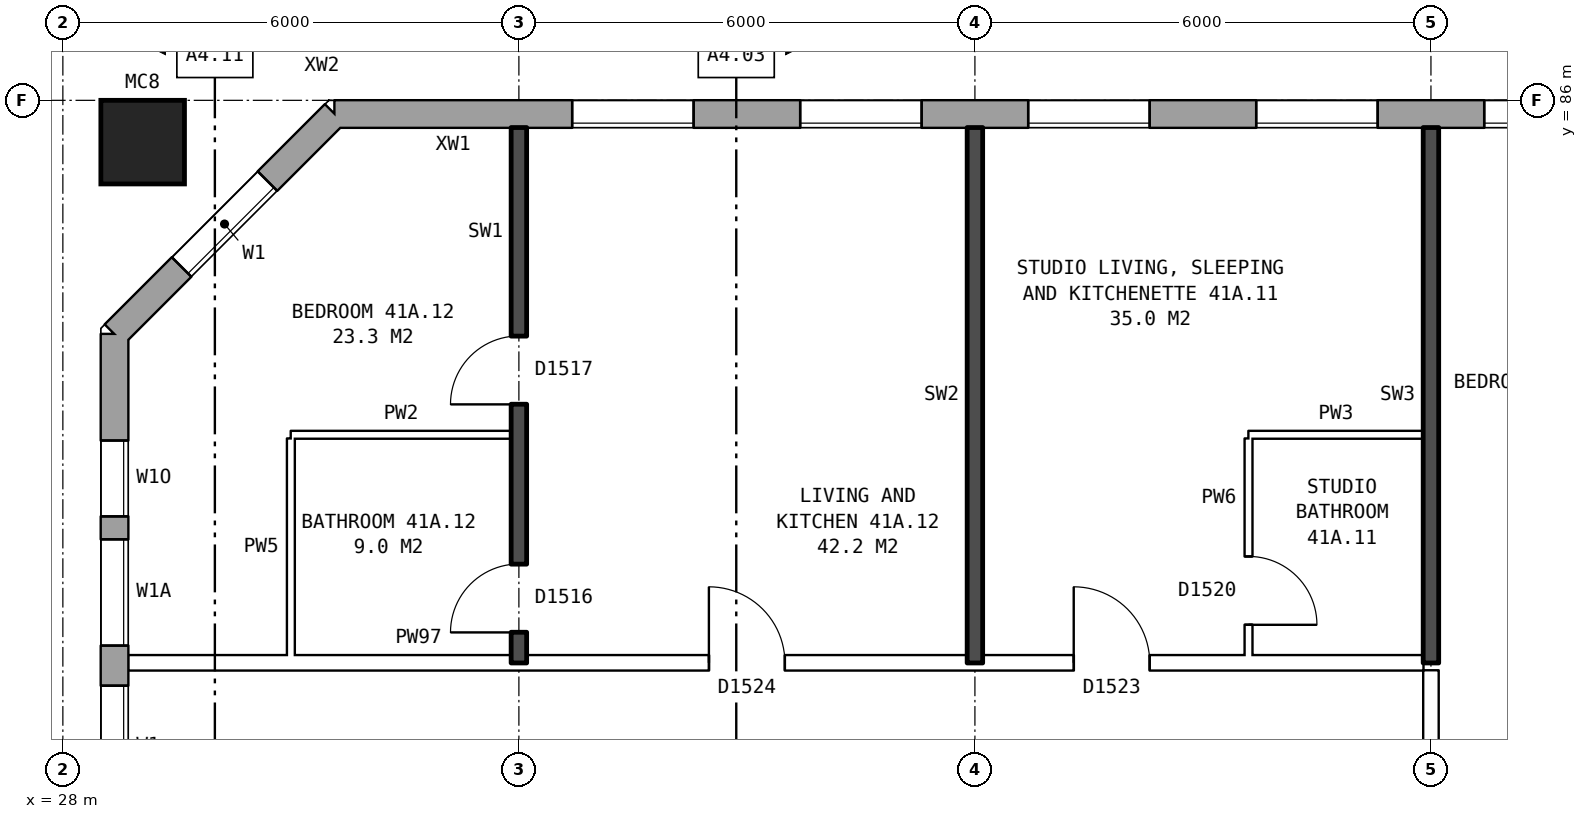
"""IFC4 building model, lengths in metres.
Left out: names, types, materials, properties, quantities, classifications, styles, units other than length and angle.
Written with IfcOpenShell. Run it as: python <this file> out.ifc"""

import sys

from ifc_helpers import new_model, si_unit, direction, frame, frame_2d, origin, origin_2d, place, context, subcontext, project, spatial, rectangle, hollow_rectangle, extrude, element, fill, save


model = new_model("IFC4")
c1 = context("Model", 3, precision=1e-05, world=origin(), true_north=direction((0.0, 1.0)))
c2 = subcontext(c1, "Body", "Model", "MODEL_VIEW")
j1 = project(units=[si_unit("LENGTHUNIT", "METRE"), si_unit("PLANEANGLEUNIT", "RADIAN")], contexts=[c1])
p1 = place(None, origin())
s1 = spatial("IfcSite", under=j1, at=p1, CompositionType="ELEMENT")
p2 = place(p1, origin())
s2 = spatial("IfcBuilding", under=s1, at=p2, CompositionType="ELEMENT")
p3 = place(p2, frame((0.0, 0.0, 148.5)))
s3 = spatial("IfcBuildingStorey", under=s2, at=p3, CompositionType="ELEMENT", Elevation=148.5)
p4 = place(p3, frame((29.05, 85.45, 0.0), z_axis=(0.0, 0.0, 1.0), x_axis=(1.0, 0.0, 0.0)))
e1 = element("IfcColumn", 1, at=p4, inside=s3, PredefinedType="COLUMN", context=c2, shape_type="SweptSolid", body=[
    extrude(hollow_rectangle(XDim=1.1, YDim=1.1, WallThickness=0.06, at=origin_2d()), origin(), (0.0, 0.0, 1.0), 3.1),
])
p5 = place(p3, frame((72.925, 85.82, 0.0), z_axis=(0.0, 0.0, 1.0), x_axis=(-1.0, 0.0, 0.0)))
e2 = element("IfcWall", 2, at=p5, inside=s3, PredefinedType="STANDARD", context=c2, shape_type="SweptSolid", body=[
    extrude(rectangle(XDim=41.351, YDim=0.36, at=frame_2d((20.675, 0.0))), origin(), (0.0, 0.0, 1.0), 2.85),
])
p6 = place(p5, frame((0.3, 0.0, 0.8)))
e3 = element("IfcOpeningElement", 3, at=p6, cuts=e2, PredefinedType="OPENING", context=c2, shape_type="SweptSolid", body=[
    extrude(rectangle(XDim=0.8, YDim=0.9, at=frame_2d((0.4, 0.45))), frame((0.0, 0.19, 0.0), z_axis=(0.0, -1.0, 0.0), x_axis=(1.0, 0.0, 0.0)), (0.0, 0.0, 1.0), 0.38),
])
p7 = place(p5, frame((3.625, 0.0, 0.8)))
e4 = element("IfcOpeningElement", 4, at=p7, cuts=e2, PredefinedType="OPENING", context=c2, shape_type="SweptSolid", body=[
    extrude(rectangle(XDim=1.6, YDim=1.8, at=frame_2d((0.8, 0.9))), frame((0.0, 0.19, 0.0), z_axis=(0.0, -1.0, 0.0), x_axis=(1.0, 0.0, 0.0)), (0.0, 0.0, 1.0), 0.38),
])
p8 = place(p5, frame((6.625, 0.0, 0.8)))
e5 = element("IfcOpeningElement", 5, at=p8, cuts=e2, PredefinedType="OPENING", context=c2, shape_type="SweptSolid", body=[
    extrude(rectangle(XDim=1.6, YDim=1.8, at=frame_2d((0.8, 0.9))), frame((0.0, 0.19, 0.0), z_axis=(0.0, -1.0, 0.0), x_axis=(1.0, 0.0, 0.0)), (0.0, 0.0, 1.0), 0.38),
])
p9 = place(p5, frame((9.625, 0.0, 0.8)))
e6 = element("IfcOpeningElement", 6, at=p9, cuts=e2, PredefinedType="OPENING", context=c2, shape_type="SweptSolid", body=[
    extrude(rectangle(XDim=1.6, YDim=1.8, at=frame_2d((0.8, 0.9))), frame((0.0, 0.19, 0.0), z_axis=(0.0, -1.0, 0.0), x_axis=(1.0, 0.0, 0.0)), (0.0, 0.0, 1.0), 0.38),
])
p10 = place(p5, frame((12.625, 0.0, 0.8)))
e7 = element("IfcOpeningElement", 7, at=p10, cuts=e2, PredefinedType="OPENING", context=c2, shape_type="SweptSolid", body=[
    extrude(rectangle(XDim=1.6, YDim=1.8, at=frame_2d((0.8, 0.9))), frame((0.0, 0.19, 0.0), z_axis=(0.0, -1.0, 0.0), x_axis=(1.0, 0.0, 0.0)), (0.0, 0.0, 1.0), 0.38),
])
p11 = place(p5, frame((15.625, 0.0, 0.8)))
e8 = element("IfcOpeningElement", 8, at=p11, cuts=e2, PredefinedType="OPENING", context=c2, shape_type="SweptSolid", body=[
    extrude(rectangle(XDim=1.6, YDim=1.8, at=frame_2d((0.8, 0.9))), frame((0.0, 0.19, 0.0), z_axis=(0.0, -1.0, 0.0), x_axis=(1.0, 0.0, 0.0)), (0.0, 0.0, 1.0), 0.38),
])
p12 = place(p5, frame((18.625, 0.0, 0.8)))
e9 = element("IfcOpeningElement", 9, at=p12, cuts=e2, PredefinedType="OPENING", context=c2, shape_type="SweptSolid", body=[
    extrude(rectangle(XDim=1.6, YDim=1.8, at=frame_2d((0.8, 0.9))), frame((0.0, 0.19, 0.0), z_axis=(0.0, -1.0, 0.0), x_axis=(1.0, 0.0, 0.0)), (0.0, 0.0, 1.0), 0.38),
])
p13 = place(p5, frame((21.625, 0.0, 0.8)))
e10 = element("IfcOpeningElement", 10, at=p13, cuts=e2, PredefinedType="OPENING", context=c2, shape_type="SweptSolid", body=[
    extrude(rectangle(XDim=1.6, YDim=1.8, at=frame_2d((0.8, 0.9))), frame((0.0, 0.19, 0.0), z_axis=(0.0, -1.0, 0.0), x_axis=(1.0, 0.0, 0.0)), (0.0, 0.0, 1.0), 0.38),
])
p14 = place(p5, frame((24.625, 0.0, 0.8)))
e11 = element("IfcOpeningElement", 11, at=p14, cuts=e2, PredefinedType="OPENING", context=c2, shape_type="SweptSolid", body=[
    extrude(rectangle(XDim=1.6, YDim=1.8, at=frame_2d((0.8, 0.9))), frame((0.0, 0.19, 0.0), z_axis=(0.0, -1.0, 0.0), x_axis=(1.0, 0.0, 0.0)), (0.0, 0.0, 1.0), 0.38),
])
p15 = place(p5, frame((27.625, 0.0, 0.8)))
e12 = element("IfcOpeningElement", 12, at=p15, cuts=e2, PredefinedType="OPENING", context=c2, shape_type="SweptSolid", body=[
    extrude(rectangle(XDim=1.6, YDim=1.8, at=frame_2d((0.8, 0.9))), frame((0.0, 0.19, 0.0), z_axis=(0.0, -1.0, 0.0), x_axis=(1.0, 0.0, 0.0)), (0.0, 0.0, 1.0), 0.38),
])
p16 = place(p5, frame((30.625, 0.0, 0.8)))
e13 = element("IfcOpeningElement", 13, at=p16, cuts=e2, PredefinedType="OPENING", context=c2, shape_type="SweptSolid", body=[
    extrude(rectangle(XDim=1.6, YDim=1.8, at=frame_2d((0.8, 0.9))), frame((0.0, 0.19, 0.0), z_axis=(0.0, -1.0, 0.0), x_axis=(1.0, 0.0, 0.0)), (0.0, 0.0, 1.0), 0.38),
])
p17 = place(p5, frame((33.625, 0.0, 0.8)))
e14 = element("IfcOpeningElement", 14, at=p17, cuts=e2, PredefinedType="OPENING", context=c2, shape_type="SweptSolid", body=[
    extrude(rectangle(XDim=1.6, YDim=1.8, at=frame_2d((0.8, 0.9))), frame((0.0, 0.19, 0.0), z_axis=(0.0, -1.0, 0.0), x_axis=(1.0, 0.0, 0.0)), (0.0, 0.0, 1.0), 0.38),
])
p18 = place(p5, frame((36.625, 0.0, 0.8)))
e15 = element("IfcOpeningElement", 15, at=p18, cuts=e2, PredefinedType="OPENING", context=c2, shape_type="SweptSolid", body=[
    extrude(rectangle(XDim=1.6, YDim=1.8, at=frame_2d((0.8, 0.9))), frame((0.0, 0.19, 0.0), z_axis=(0.0, -1.0, 0.0), x_axis=(1.0, 0.0, 0.0)), (0.0, 0.0, 1.0), 0.38),
])
p19 = place(p5, frame((1.4, 0.0, 0.8)))
e16 = element("IfcOpeningElement", 16, at=p19, cuts=e2, PredefinedType="OPENING", context=c2, shape_type="SweptSolid", body=[
    extrude(rectangle(XDim=1.2, YDim=1.8, at=frame_2d((0.6, 0.9))), frame((0.0, 0.19, 0.0), z_axis=(0.0, -1.0, 0.0), x_axis=(1.0, 0.0, 0.0)), (0.0, 0.0, 1.0), 0.38),
])
p20 = place(p3, frame((31.575, 85.82, 0.0), z_axis=(0.0, 0.0, 1.0), x_axis=(-0.707106781187, -0.707106781187, 0.0)))
e17 = element("IfcWall", 17, at=p20, inside=s3, PredefinedType="STANDARD", context=c2, shape_type="SweptSolid", body=[
    extrude(rectangle(XDim=4.094, YDim=0.36, at=frame_2d((2.047, 0.0))), origin(), (0.0, 0.0, 1.0), 2.85),
])
p21 = place(p20, frame((1.247, 0.0, 0.8)))
e18 = element("IfcOpeningElement", 18, at=p21, cuts=e17, PredefinedType="OPENING", context=c2, shape_type="SweptSolid", body=[
    extrude(rectangle(XDim=1.6, YDim=1.8, at=frame_2d((0.8, 0.9))), frame((0.0, 0.19, 0.0), z_axis=(0.0, -1.0, 0.0), x_axis=(1.0, 0.0, 0.0)), (0.0, 0.0, 1.0), 0.38),
])
p22 = place(p3, frame((28.68, 82.925, 0.0), z_axis=(0.0, 0.0, 1.0), x_axis=(0.0, -1.0, 0.0)))
e19 = element("IfcWall", 19, at=p22, inside=s3, PredefinedType="STANDARD", context=c2, shape_type="SweptSolid", body=[
    extrude(rectangle(XDim=25.851, YDim=0.36, at=frame_2d((12.925, 0.0))), origin(), (0.0, 0.0, 1.0), 2.85),
])
p23 = place(p22, frame((1.4, 0.0, 0.8)))
e20 = element("IfcOpeningElement", 20, at=p23, cuts=e19, PredefinedType="OPENING", context=c2, shape_type="SweptSolid", body=[
    extrude(rectangle(XDim=1.0, YDim=1.2, at=frame_2d((0.5, 0.6))), frame((0.0, 0.19, 0.0), z_axis=(0.0, -1.0, 0.0), x_axis=(1.0, 0.0, 0.0)), (0.0, 0.0, 1.0), 0.38),
])
p24 = place(p22, frame((4.625, 0.0, 0.8)))
e21 = element("IfcOpeningElement", 21, at=p24, cuts=e19, PredefinedType="OPENING", context=c2, shape_type="SweptSolid", body=[
    extrude(rectangle(XDim=1.6, YDim=1.8, at=frame_2d((0.8, 0.9))), frame((0.0, 0.19, 0.0), z_axis=(0.0, -1.0, 0.0), x_axis=(1.0, 0.0, 0.0)), (0.0, 0.0, 1.0), 0.38),
])
p25 = place(p22, frame((7.625, 0.0, 0.8)))
e22 = element("IfcOpeningElement", 22, at=p25, cuts=e19, PredefinedType="OPENING", context=c2, shape_type="SweptSolid", body=[
    extrude(rectangle(XDim=1.6, YDim=1.8, at=frame_2d((0.8, 0.9))), frame((0.0, 0.19, 0.0), z_axis=(0.0, -1.0, 0.0), x_axis=(1.0, 0.0, 0.0)), (0.0, 0.0, 1.0), 0.38),
])
p26 = place(p22, frame((10.625, 0.0, 0.8)))
e23 = element("IfcOpeningElement", 23, at=p26, cuts=e19, PredefinedType="OPENING", context=c2, shape_type="SweptSolid", body=[
    extrude(rectangle(XDim=1.6, YDim=1.8, at=frame_2d((0.8, 0.9))), frame((0.0, 0.19, 0.0), z_axis=(0.0, -1.0, 0.0), x_axis=(1.0, 0.0, 0.0)), (0.0, 0.0, 1.0), 0.38),
])
p27 = place(p22, frame((13.625, 0.0, 0.8)))
e24 = element("IfcOpeningElement", 24, at=p27, cuts=e19, PredefinedType="OPENING", context=c2, shape_type="SweptSolid", body=[
    extrude(rectangle(XDim=1.6, YDim=1.8, at=frame_2d((0.8, 0.9))), frame((0.0, 0.19, 0.0), z_axis=(0.0, -1.0, 0.0), x_axis=(1.0, 0.0, 0.0)), (0.0, 0.0, 1.0), 0.38),
])
p28 = place(p22, frame((16.625, 0.0, 0.8)))
e25 = element("IfcOpeningElement", 25, at=p28, cuts=e19, PredefinedType="OPENING", context=c2, shape_type="SweptSolid", body=[
    extrude(rectangle(XDim=1.6, YDim=1.8, at=frame_2d((0.8, 0.9))), frame((0.0, 0.19, 0.0), z_axis=(0.0, -1.0, 0.0), x_axis=(1.0, 0.0, 0.0)), (0.0, 0.0, 1.0), 0.38),
])
p29 = place(p22, frame((19.625, 0.0, 0.8)))
e26 = element("IfcOpeningElement", 26, at=p29, cuts=e19, PredefinedType="OPENING", context=c2, shape_type="SweptSolid", body=[
    extrude(rectangle(XDim=1.6, YDim=1.8, at=frame_2d((0.8, 0.9))), frame((0.0, 0.19, 0.0), z_axis=(0.0, -1.0, 0.0), x_axis=(1.0, 0.0, 0.0)), (0.0, 0.0, 1.0), 0.38),
])
p30 = place(p22, frame((21.725, 0.0, 0.8)))
e27 = element("IfcOpeningElement", 27, at=p30, cuts=e19, PredefinedType="OPENING", context=c2, shape_type="SweptSolid", body=[
    extrude(rectangle(XDim=1.4, YDim=1.8, at=frame_2d((0.7, 0.9))), frame((0.0, 0.19, 0.0), z_axis=(0.0, -1.0, 0.0), x_axis=(1.0, 0.0, 0.0)), (0.0, 0.0, 1.0), 0.38),
])
p31 = place(p22, frame((2.7, 0.0, 0.8)))
e28 = element("IfcOpeningElement", 28, at=p31, cuts=e19, PredefinedType="OPENING", context=c2, shape_type="SweptSolid", body=[
    extrude(rectangle(XDim=1.4, YDim=1.8, at=frame_2d((0.7, 0.9))), frame((0.0, 0.19, 0.0), z_axis=(0.0, -1.0, 0.0), x_axis=(1.0, 0.0, 0.0)), (0.0, 0.0, 1.0), 0.38),
])
p32 = place(p22, frame((23.425, 0.0, 0.8)))
e29 = element("IfcOpeningElement", 29, at=p32, cuts=e19, PredefinedType="OPENING", context=c2, shape_type="SweptSolid", body=[
    extrude(rectangle(XDim=1.0, YDim=1.2, at=frame_2d((0.5, 0.6))), frame((0.0, 0.19, 0.0), z_axis=(0.0, -1.0, 0.0), x_axis=(1.0, 0.0, 0.0)), (0.0, 0.0, 1.0), 0.38),
])
p33 = place(p3, frame((28.86, 78.6, 0.0), z_axis=(0.0, 0.0, 1.0), x_axis=(1.0, 0.0, 0.0)))
e30 = element("IfcWall", 30, at=p33, inside=s3, PredefinedType="PARTITIONING", context=c2, shape_type="SweptSolid", body=[
    extrude(rectangle(XDim=17.04, YDim=0.2, at=frame_2d((8.52, 0.0))), origin(), (0.0, 0.0, 1.0), 2.85),
])
p34 = place(p33, frame((12.44, 0.0, 0.0)))
e31 = element("IfcOpeningElement", 31, at=p34, cuts=e30, PredefinedType="OPENING", context=c2, shape_type="SweptSolid", body=[
    extrude(rectangle(XDim=1.0, YDim=2.1, at=frame_2d((0.5, 1.05))), frame((0.0, 0.11, 0.0), z_axis=(0.0, -1.0, 0.0), x_axis=(1.0, 0.0, 0.0)), (0.0, 0.0, 1.0), 0.22),
])
p35 = place(p33, frame((7.64, 0.0, 0.0)))
e32 = element("IfcOpeningElement", 32, at=p35, cuts=e30, PredefinedType="OPENING", context=c2, shape_type="SweptSolid", body=[
    extrude(rectangle(XDim=1.0, YDim=2.1, at=frame_2d((0.5, 1.05))), frame((0.0, 0.11, 0.0), z_axis=(0.0, -1.0, 0.0), x_axis=(1.0, 0.0, 0.0)), (0.0, 0.0, 1.0), 0.22),
])
p36 = place(p3, frame((31.0, 81.6, 0.0), z_axis=(0.0, 0.0, 1.0), x_axis=(1.0, 0.0, 0.0)))
e33 = element("IfcWall", 33, at=p36, inside=s3, PredefinedType="PARTITIONING", context=c2, shape_type="SweptSolid", body=[
    extrude(rectangle(XDim=2.9, YDim=0.1, at=frame_2d((1.45, 0.0))), origin(), (0.0, 0.0, 1.0), 2.85),
])
p37 = place(p3, frame((43.6, 81.6, 0.0), z_axis=(0.0, 0.0, 1.0), x_axis=(1.0, 0.0, 0.0)))
e34 = element("IfcWall", 34, at=p37, inside=s3, PredefinedType="PARTITIONING", context=c2, shape_type="SweptSolid", body=[
    extrude(rectangle(XDim=2.3, YDim=0.1, at=frame_2d((1.15, 0.0))), origin(), (0.0, 0.0, 1.0), 2.85),
])
p38 = place(p3, frame((31.0, 78.7, 0.0), z_axis=(0.0, 0.0, 1.0), x_axis=(0.0, 1.0, 0.0)))
e35 = element("IfcWall", 35, at=p38, inside=s3, PredefinedType="PARTITIONING", context=c2, shape_type="SweptSolid", body=[
    extrude(rectangle(XDim=2.85, YDim=0.1, at=frame_2d((1.425, 0.0))), origin(), (0.0, 0.0, 1.0), 2.85),
])
p39 = place(p3, frame((34.0, 78.6, 0.0), z_axis=(0.0, 0.0, 1.0), x_axis=(0.0, 1.0, 0.0)))
e36 = element("IfcWall", 36, at=p39, inside=s3, PredefinedType="SOLIDWALL", context=c2, shape_type="SweptSolid", body=[
    extrude(rectangle(XDim=7.04, YDim=0.2, at=frame_2d((3.52, 0.0))), origin(), (0.0, 0.0, 1.0), 2.85),
])
p40 = place(p39, frame((3.4, 0.0, 0.0)))
e37 = element("IfcOpeningElement", 37, at=p40, cuts=e36, PredefinedType="OPENING", context=c2, shape_type="SweptSolid", body=[
    extrude(rectangle(XDim=0.9, YDim=2.1, at=frame_2d((0.45, 1.05))), frame((0.0, 0.11, 0.0), z_axis=(0.0, -1.0, 0.0), x_axis=(1.0, 0.0, 0.0)), (0.0, 0.0, 1.0), 0.22),
])
p41 = place(p39, frame((0.4, 0.0, 0.0)))
e38 = element("IfcOpeningElement", 38, at=p41, cuts=e36, PredefinedType="OPENING", context=c2, shape_type="SweptSolid", body=[
    extrude(rectangle(XDim=0.9, YDim=2.1, at=frame_2d((0.45, 1.05))), frame((0.0, 0.11, 0.0), z_axis=(0.0, -1.0, 0.0), x_axis=(1.0, 0.0, 0.0)), (0.0, 0.0, 1.0), 0.22),
])
p42 = place(p3, frame((40.0, 78.6, 0.0), z_axis=(0.0, 0.0, 1.0), x_axis=(0.0, 1.0, 0.0)))
e39 = element("IfcWall", 39, at=p42, inside=s3, PredefinedType="SOLIDWALL", context=c2, shape_type="SweptSolid", body=[
    extrude(rectangle(XDim=7.04, YDim=0.2, at=frame_2d((3.52, 0.0))), origin(), (0.0, 0.0, 1.0), 2.85),
])
p43 = place(p3, frame((43.6, 78.7, 0.0), z_axis=(0.0, 0.0, 1.0), x_axis=(0.0, 1.0, 0.0)))
e40 = element("IfcWall", 40, at=p43, inside=s3, PredefinedType="PARTITIONING", context=c2, shape_type="SweptSolid", body=[
    extrude(rectangle(XDim=2.85, YDim=0.1, at=frame_2d((1.425, 0.0))), origin(), (0.0, 0.0, 1.0), 2.85),
])
p44 = place(p43, frame((0.4, 0.0, 0.0)))
e41 = element("IfcOpeningElement", 41, at=p44, cuts=e40, PredefinedType="OPENING", context=c2, shape_type="SweptSolid", body=[
    extrude(rectangle(XDim=0.9, YDim=2.1, at=frame_2d((0.45, 1.05))), frame((0.0, 0.06, 0.0), z_axis=(0.0, -1.0, 0.0), x_axis=(1.0, 0.0, 0.0)), (0.0, 0.0, 1.0), 0.12),
])
p45 = place(p3, frame((46.0, 76.3, 0.0), z_axis=(0.0, 0.0, 1.0), x_axis=(0.0, 1.0, 0.0)))
e42 = element("IfcWall", 42, at=p45, inside=s3, PredefinedType="PARTITIONING", context=c2, shape_type="SweptSolid", body=[
    extrude(rectangle(XDim=2.2, YDim=0.2, at=frame_2d((1.1, 0.0))), origin(), (0.0, 0.0, 1.0), 2.85),
])
p46 = place(p3, frame((46.0, 78.6, 0.0), z_axis=(0.0, 0.0, 1.0), x_axis=(0.0, 1.0, 0.0)))
e43 = element("IfcWall", 43, at=p46, inside=s3, PredefinedType="SOLIDWALL", context=c2, shape_type="SweptSolid", body=[
    extrude(rectangle(XDim=7.04, YDim=0.2, at=frame_2d((3.52, 0.0))), origin(), (0.0, 0.0, 1.0), 2.85),
])
p47 = place(p14, origin())
e44 = element("IfcWindow", 44, at=p47, inside=s3, PartitioningType="SINGLE_PANEL", PredefinedType="WINDOW", context=c2, shape_type="SweptSolid", body=[
    extrude(rectangle(XDim=1.6, YDim=1.8, at=frame_2d((0.8, 0.9))), frame((0.0, 0.15, 0.0), z_axis=(0.0, -1.0, 0.0), x_axis=(1.0, 0.0, 0.0)), (0.0, 0.0, 1.0), 0.06),
])
fill(e11, e44)
p48 = place(p15, origin())
e45 = element("IfcWindow", 45, at=p48, inside=s3, PartitioningType="SINGLE_PANEL", PredefinedType="WINDOW", context=c2, shape_type="SweptSolid", body=[
    extrude(rectangle(XDim=1.6, YDim=1.8, at=frame_2d((0.8, 0.9))), frame((0.0, 0.15, 0.0), z_axis=(0.0, -1.0, 0.0), x_axis=(1.0, 0.0, 0.0)), (0.0, 0.0, 1.0), 0.06),
])
fill(e12, e45)
p49 = place(p16, origin())
e46 = element("IfcWindow", 46, at=p49, inside=s3, PartitioningType="SINGLE_PANEL", PredefinedType="WINDOW", context=c2, shape_type="SweptSolid", body=[
    extrude(rectangle(XDim=1.6, YDim=1.8, at=frame_2d((0.8, 0.9))), frame((0.0, 0.15, 0.0), z_axis=(0.0, -1.0, 0.0), x_axis=(1.0, 0.0, 0.0)), (0.0, 0.0, 1.0), 0.06),
])
fill(e13, e46)
p50 = place(p17, origin())
e47 = element("IfcWindow", 47, at=p50, inside=s3, PartitioningType="SINGLE_PANEL", PredefinedType="WINDOW", context=c2, shape_type="SweptSolid", body=[
    extrude(rectangle(XDim=1.6, YDim=1.8, at=frame_2d((0.8, 0.9))), frame((0.0, 0.15, 0.0), z_axis=(0.0, -1.0, 0.0), x_axis=(1.0, 0.0, 0.0)), (0.0, 0.0, 1.0), 0.06),
])
fill(e14, e47)
p51 = place(p18, origin())
e48 = element("IfcWindow", 48, at=p51, inside=s3, PartitioningType="SINGLE_PANEL", PredefinedType="WINDOW", context=c2, shape_type="SweptSolid", body=[
    extrude(rectangle(XDim=1.6, YDim=1.8, at=frame_2d((0.8, 0.9))), frame((0.0, 0.15, 0.0), z_axis=(0.0, -1.0, 0.0), x_axis=(1.0, 0.0, 0.0)), (0.0, 0.0, 1.0), 0.06),
])
fill(e15, e48)
p52 = place(p21, origin())
e49 = element("IfcWindow", 49, at=p52, inside=s3, PartitioningType="SINGLE_PANEL", PredefinedType="WINDOW", context=c2, shape_type="SweptSolid", body=[
    extrude(rectangle(XDim=1.6, YDim=1.8, at=frame_2d((0.8, 0.9))), frame((0.0, 0.15, 0.0), z_axis=(0.0, -1.0, 0.0), x_axis=(1.0, 0.0, 0.0)), (0.0, 0.0, 1.0), 0.06),
])
fill(e18, e49)
p53 = place(p23, origin())
e50 = element("IfcWindow", 50, at=p53, inside=s3, PartitioningType="SINGLE_PANEL", PredefinedType="WINDOW", context=c2, shape_type="SweptSolid", body=[
    extrude(rectangle(XDim=1.0, YDim=1.2, at=frame_2d((0.5, 0.6))), frame((0.0, 0.15, 0.0), z_axis=(0.0, -1.0, 0.0), x_axis=(1.0, 0.0, 0.0)), (0.0, 0.0, 1.0), 0.06),
])
fill(e20, e50)
p54 = place(p24, origin())
e51 = element("IfcWindow", 51, at=p54, inside=s3, PartitioningType="SINGLE_PANEL", PredefinedType="WINDOW", context=c2, shape_type="SweptSolid", body=[
    extrude(rectangle(XDim=1.6, YDim=1.8, at=frame_2d((0.8, 0.9))), frame((0.0, 0.15, 0.0), z_axis=(0.0, -1.0, 0.0), x_axis=(1.0, 0.0, 0.0)), (0.0, 0.0, 1.0), 0.06),
])
fill(e21, e51)
p55 = place(p34, origin())
e52 = element("IfcDoor", 52, at=p55, inside=s3, OperationType="SINGLE_SWING_LEFT", PredefinedType="DOOR", context=c2, shape_type="SweptSolid", body=[
    extrude(rectangle(XDim=1.0, YDim=2.1, at=frame_2d((0.5, 1.05))), frame((0.0, 0.025, 0.0), z_axis=(0.0, -1.0, 0.0), x_axis=(1.0, 0.0, 0.0)), (0.0, 0.0, 1.0), 0.05),
])
fill(e31, e52)
p56 = place(p44, frame((0.9, 0.0, 0.0), z_axis=(0.0, 0.0, 1.0), x_axis=(-1.0, 0.0, 0.0)))
e53 = element("IfcDoor", 53, at=p56, inside=s3, OperationType="SINGLE_SWING_RIGHT", PredefinedType="DOOR", context=c2, shape_type="SweptSolid", body=[
    extrude(rectangle(XDim=0.9, YDim=2.1, at=frame_2d((0.45, 1.05))), frame((0.0, 0.025, 0.0), z_axis=(0.0, -1.0, 0.0), x_axis=(1.0, 0.0, 0.0)), (0.0, 0.0, 1.0), 0.05),
])
fill(e41, e53)
p57 = place(p40, origin())
e54 = element("IfcDoor", 54, at=p57, inside=s3, OperationType="SINGLE_SWING_LEFT", PredefinedType="DOOR", context=c2, shape_type="SweptSolid", body=[
    extrude(rectangle(XDim=0.9, YDim=2.1, at=frame_2d((0.45, 1.05))), frame((0.0, 0.025, 0.0), z_axis=(0.0, -1.0, 0.0), x_axis=(1.0, 0.0, 0.0)), (0.0, 0.0, 1.0), 0.05),
])
fill(e37, e54)
p58 = place(p35, origin())
e55 = element("IfcDoor", 55, at=p58, inside=s3, OperationType="SINGLE_SWING_LEFT", PredefinedType="DOOR", context=c2, shape_type="SweptSolid", body=[
    extrude(rectangle(XDim=1.0, YDim=2.1, at=frame_2d((0.5, 1.05))), frame((0.0, 0.025, 0.0), z_axis=(0.0, -1.0, 0.0), x_axis=(1.0, 0.0, 0.0)), (0.0, 0.0, 1.0), 0.05),
])
fill(e32, e55)
p59 = place(p41, origin())
e56 = element("IfcDoor", 56, at=p59, inside=s3, OperationType="SINGLE_SWING_LEFT", PredefinedType="DOOR", context=c2, shape_type="SweptSolid", body=[
    extrude(rectangle(XDim=0.9, YDim=2.1, at=frame_2d((0.45, 1.05))), frame((0.0, 0.025, 0.0), z_axis=(0.0, -1.0, 0.0), x_axis=(1.0, 0.0, 0.0)), (0.0, 0.0, 1.0), 0.05),
])
fill(e38, e56)
p60 = place(p31, origin())
e57 = element("IfcWindow", 57, at=p60, inside=s3, PartitioningType="SINGLE_PANEL", PredefinedType="WINDOW", context=c2, shape_type="SweptSolid", body=[
    extrude(rectangle(XDim=1.4, YDim=1.8, at=frame_2d((0.7, 0.9))), frame((0.0, 0.15, 0.0), z_axis=(0.0, -1.0, 0.0), x_axis=(1.0, 0.0, 0.0)), (0.0, 0.0, 1.0), 0.06),
])
fill(e28, e57)
save(model, sys.argv[1])
